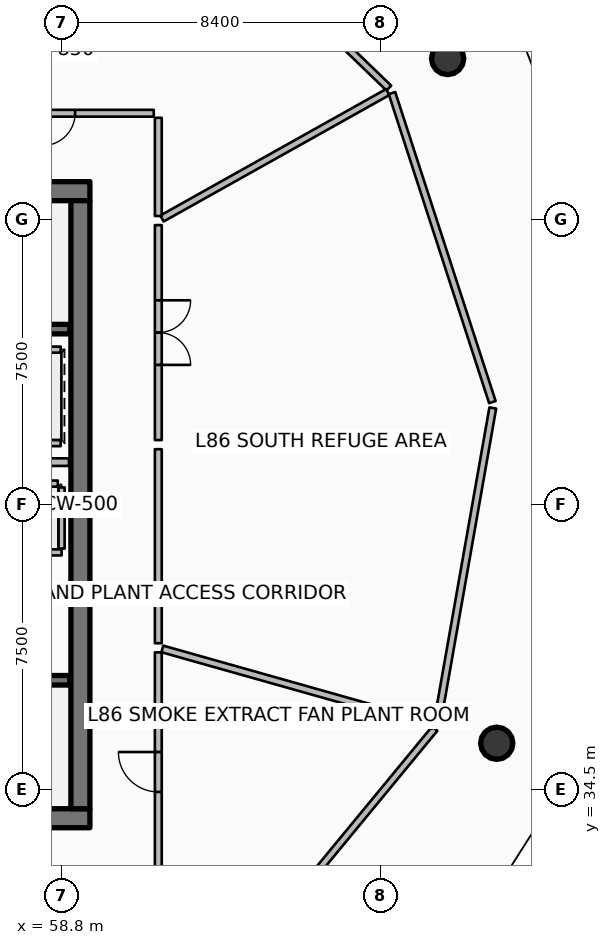
"""IFC4 building model, lengths in metres.
Left out: names, types, materials, properties, quantities, classifications, styles, units other than length and angle.
Written with IfcOpenShell. Run it as: python <this file> out.ifc"""

import sys

from ifc_helpers import new_model, si_unit, direction, frame, frame_2d, origin, origin_2d, place, context, subcontext, project, spatial, rectangle, circle, extrude, element, fill, save


model = new_model("IFC4")
c1 = context("Model", 3, precision=1e-05, world=origin(), true_north=direction((0.0, 1.0)))
c2 = subcontext(c1, "Body", "Model", "MODEL_VIEW")
j1 = project(units=[si_unit("LENGTHUNIT", "METRE"), si_unit("PLANEANGLEUNIT", "RADIAN")], contexts=[c1])
p1 = place(None, origin())
s1 = spatial("IfcSite", under=j1, at=p1, CompositionType="ELEMENT")
p2 = place(p1, origin())
s2 = spatial("IfcBuilding", under=s1, at=p2, CompositionType="ELEMENT")
p3 = place(p2, frame((0.0, 0.0, 343.1)))
s3 = spatial("IfcBuildingStorey", under=s2, at=p3, CompositionType="ELEMENT", Elevation=343.1)
for number, where, z_axis, x_axis in (
    (1, (49.95, 33.75, 0.0), (0.0, 0.0, 1.0), (1.0, 0.0, 0.0)),
    (2, (49.95, 50.25, 0.0), (0.0, 0.0, 1.0), (1.0, 0.0, 0.0)),
):
    element("IfcWall", number, at=place(p3, frame(where, z_axis=z_axis, x_axis=x_axis)), inside=s3, PredefinedType="SHEAR", context=c2, shape_type="SweptSolid", body=[
        extrude(rectangle(XDim=9.6, YDim=0.5, at=frame_2d((4.8, 0.0))), origin(), (0.0, 0.0, 1.0), 4.2),
    ])
p4 = place(p3, frame((59.3, 34.0, 0.0), z_axis=(0.0, 0.0, 1.0), x_axis=(0.0, 1.0, 0.0)))
e3 = element("IfcWall", 3, at=p4, inside=s3, PredefinedType="SHEAR", context=c2, shape_type="SweptSolid", body=[
    extrude(rectangle(XDim=16.0, YDim=0.5, at=frame_2d((8.0, 0.0))), origin(), (0.0, 0.0, 1.0), 4.2),
])
for number, where, z_axis, x_axis in (
    (4, (68.963, 53.74, 0.0), (0.0, 0.0, 1.0), (1.0, 0.0, 0.0)),
    (5, (70.256, 35.723, 0.0), (0.0, 0.0, 1.0), (1.0, 0.0, 0.0)),
):
    element("IfcColumn", number, at=place(p3, frame(where, z_axis=z_axis, x_axis=x_axis)), inside=s3, PredefinedType="COLUMN", context=c2, shape_type="SweptSolid", body=[
        extrude(circle(Radius=0.425, at=origin_2d()), origin(), (0.0, 0.0, 1.0), 3.94),
    ])
p5 = place(p3, frame((51.48, 46.62, 0.0), z_axis=(0.0, 0.0, 1.0), x_axis=(1.0, 0.0, 0.0)))
e6 = element("IfcWall", 6, at=p5, inside=s3, PredefinedType="SOLIDWALL", context=c2, shape_type="SweptSolid", body=[
    extrude(rectangle(XDim=7.54, YDim=0.25, at=frame_2d((3.77, 0.0))), origin(), (0.0, 0.0, 1.0), 3.94),
])
p6 = place(p5, frame((0.3, 0.0, 0.0)))
e7 = element("IfcOpeningElement", 7, at=p6, cuts=e6, PredefinedType="OPENING", context=c2, shape_type="SweptSolid", body=[
    extrude(rectangle(XDim=1.55, YDim=2.15, at=frame_2d((0.775, 1.075))), frame((0.0, 0.135, 0.0), z_axis=(0.0, -1.0, 0.0), x_axis=(1.0, 0.0, 0.0)), (0.0, 0.0, 1.0), 0.27),
])
p7 = place(p3, frame((51.48, 37.38, 0.0), z_axis=(0.0, 0.0, 1.0), x_axis=(1.0, 0.0, 0.0)))
e8 = element("IfcWall", 8, at=p7, inside=s3, PredefinedType="SOLIDWALL", context=c2, shape_type="SweptSolid", body=[
    extrude(rectangle(XDim=7.54, YDim=0.25, at=frame_2d((3.77, 0.0))), origin(), (0.0, 0.0, 1.0), 3.94),
])
p8 = place(p7, frame((0.3, 0.0, 0.0)))
e9 = element("IfcOpeningElement", 9, at=p8, cuts=e8, PredefinedType="OPENING", context=c2, shape_type="SweptSolid", body=[
    extrude(rectangle(XDim=1.55, YDim=2.15, at=frame_2d((0.775, 1.075))), frame((0.0, 0.135, 0.0), z_axis=(0.0, -1.0, 0.0), x_axis=(1.0, 0.0, 0.0)), (0.0, 0.0, 1.0), 0.27),
])
p9 = place(p3, frame((58.805, 40.745, 0.0), z_axis=(0.0, 0.0, 1.0), x_axis=(-1.0, 0.0, 0.0)))
e10 = element("IfcWall", 10, at=p9, inside=s3, PredefinedType="PARTITIONING", context=c2, shape_type="SweptSolid", body=[
    extrude(rectangle(XDim=2.11, YDim=0.16, at=frame_2d((1.055, 0.0))), origin(), (0.0, 0.0, 1.0), 3.94),
])
p10 = place(p9, frame((0.505, 0.0, 0.0)))
e11 = element("IfcOpeningElement", 11, at=p10, cuts=e10, PredefinedType="OPENING", context=c2, shape_type="SweptSolid", body=[
    extrude(rectangle(XDim=1.1, YDim=2.1, at=frame_2d((0.55, 1.05))), frame((0.0, 0.09, 0.0), z_axis=(0.0, -1.0, 0.0), x_axis=(1.0, 0.0, 0.0)), (0.0, 0.0, 1.0), 0.18),
])
p11 = place(p3, frame((58.805, 40.845, 0.0), z_axis=(0.0, 0.0, 1.0), x_axis=(0.0, 1.0, 0.0)))
e12 = element("IfcWall", 12, at=p11, inside=s3, PredefinedType="PARTITIONING", context=c2, shape_type="SweptSolid", body=[
    extrude(rectangle(XDim=1.61, YDim=0.16, at=frame_2d((0.805, 0.0))), origin(), (0.0, 0.0, 1.0), 3.94),
])
p12 = place(p3, frame((56.795, 42.555, 0.0), z_axis=(0.0, 0.0, 1.0), x_axis=(1.0, 0.0, 0.0)))
e13 = element("IfcWall", 13, at=p12, inside=s3, PredefinedType="PARTITIONING", context=c2, shape_type="SweptSolid", body=[
    extrude(rectangle(XDim=1.91, YDim=0.16, at=frame_2d((0.955, 0.0))), origin(), (0.0, 0.0, 1.0), 3.94),
])
for number, where, z_axis, x_axis in (
    (14, (56.72, 46.08, 0.0), (0.0, 0.0, 1.0), (1.0, 0.0, 0.0)),
    (15, (56.72, 43.62, 0.0), (0.0, 0.0, 1.0), (1.0, 0.0, 0.0)),
):
    element("IfcWall", number, at=place(p3, frame(where, z_axis=z_axis, x_axis=x_axis)), inside=s3, PredefinedType="PARTITIONING", context=c2, shape_type="SweptSolid", body=[
        extrude(rectangle(XDim=2.06, YDim=0.16, at=frame_2d((1.03, 0.0))), origin(), (0.0, 0.0, 1.0), 3.94),
    ])
p13 = place(p3, frame((50.12, 43.12, 0.0), z_axis=(0.0, 0.0, 1.0), x_axis=(1.0, 0.0, 0.0)))
e16 = element("IfcWall", 16, at=p13, inside=s3, PredefinedType="PARTITIONING", context=c2, shape_type="SweptSolid", body=[
    extrude(rectangle(XDim=8.88, YDim=0.2, at=frame_2d((4.44, 0.0))), origin(), (0.0, 0.0, 1.0), 3.94),
])
p14 = place(p3, frame((67.417, 52.962, 0.0), z_axis=(0.0, 0.0, 1.0), x_axis=(-0.719358516059, 0.694638989241, 0.0)))
e17 = element("IfcWall", 17, at=p14, inside=s3, PredefinedType="PARTITIONING", context=c2, shape_type="SweptSolid", body=[
    extrude(rectangle(XDim=8.425, YDim=0.18, at=frame_2d((4.212, 0.0))), origin(), (0.0, 0.0, 1.0), 2.933),
])
p15 = place(p3, frame((63.496, 29.886, 0.0), z_axis=(0.0, 0.0, 1.0), x_axis=(0.635999094609, 0.771689802743, 0.0)))
e18 = element("IfcWall", 18, at=p15, inside=s3, PredefinedType="PARTITIONING", context=c2, shape_type="SweptSolid", body=[
    extrude(rectangle(XDim=8.062, YDim=0.18, at=frame_2d((4.031, 0.0))), origin(), (0.0, 0.0, 1.0), 2.933),
])
p16 = place(p3, frame((68.688, 36.248, 0.0), z_axis=(0.0, 0.0, 1.0), x_axis=(0.173644811024, 0.984808346636, 0.0)))
e19 = element("IfcWall", 19, at=p16, inside=s3, PredefinedType="PARTITIONING", context=c2, shape_type="SweptSolid", body=[
    extrude(rectangle(XDim=8.425, YDim=0.18, at=frame_2d((4.212, 0.0))), origin(), (0.0, 0.0, 1.0), 2.933),
])
p17 = place(p3, frame((70.141, 44.699, 0.0), z_axis=(0.0, 0.0, 1.0), x_axis=(-0.309030537088, 0.951052115894, 0.0)))
e20 = element("IfcWall", 20, at=p17, inside=s3, PredefinedType="PARTITIONING", context=c2, shape_type="SweptSolid", body=[
    extrude(rectangle(XDim=8.549, YDim=0.18, at=frame_2d((4.274, 0.0))), origin(), (0.0, 0.0, 1.0), 2.933),
])
p18 = place(p3, frame((61.35, 31.82, 0.0), z_axis=(0.0, 0.0, 1.0), x_axis=(0.0, 1.0, 0.0)))
e21 = element("IfcWall", 21, at=p18, inside=s3, PredefinedType="PARTITIONING", context=c2, shape_type="SweptSolid", body=[
    extrude(rectangle(XDim=6.295, YDim=0.18, at=frame_2d((3.147, 0.0))), origin(), (0.0, 0.0, 1.0), 2.933),
])
p19 = place(p18, frame((2.622, 0.0, 0.0)))
e22 = element("IfcOpeningElement", 22, at=p19, cuts=e21, PredefinedType="OPENING", context=c2, shape_type="SweptSolid", body=[
    extrude(rectangle(XDim=1.05, YDim=2.1, at=frame_2d((0.525, 1.05))), frame((0.0, 0.1, 0.0), z_axis=(0.0, -1.0, 0.0), x_axis=(1.0, 0.0, 0.0)), (0.0, 0.0, 1.0), 0.2),
])
p20 = place(p3, frame((61.456, 38.205, 0.0), z_axis=(0.0, 0.0, 1.0), x_axis=(0.962454537961, -0.271442926522, 0.0)))
e23 = element("IfcWall", 23, at=p20, inside=s3, PredefinedType="PARTITIONING", context=c2, shape_type="SweptSolid", body=[
    extrude(rectangle(XDim=7.4, YDim=0.18, at=frame_2d((3.7, 0.0))), origin(), (0.0, 0.0, 1.0), 2.933),
])
p21 = place(p3, frame((61.35, 38.355, 0.0), z_axis=(0.0, 0.0, 1.0), x_axis=(0.0, 1.0, 0.0)))
e24 = element("IfcWall", 24, at=p21, inside=s3, PredefinedType="PARTITIONING", context=c2, shape_type="SweptSolid", body=[
    extrude(rectangle(XDim=5.105, YDim=0.18, at=frame_2d((2.553, 0.0))), origin(), (0.0, 0.0, 1.0), 2.933),
])
p22 = place(p3, frame((61.35, 43.7, 0.0), z_axis=(0.0, 0.0, 1.0), x_axis=(0.0, 1.0, 0.0)))
e25 = element("IfcWall", 25, at=p22, inside=s3, PredefinedType="PARTITIONING", context=c2, shape_type="SweptSolid", body=[
    extrude(rectangle(XDim=5.656, YDim=0.18, at=frame_2d((2.828, 0.0))), origin(), (0.0, 0.0, 1.0), 2.933),
])
p23 = place(p22, frame((1.978, 0.0, 0.0)))
e26 = element("IfcOpeningElement", 26, at=p23, cuts=e25, PredefinedType="OPENING", context=c2, shape_type="SweptSolid", body=[
    extrude(rectangle(XDim=1.7, YDim=2.15, at=frame_2d((0.85, 1.075))), frame((0.0, 0.1, 0.0), z_axis=(0.0, -1.0, 0.0), x_axis=(1.0, 0.0, 0.0)), (0.0, 0.0, 1.0), 0.2),
])
p24 = place(p3, frame((61.446, 49.53, 0.0), z_axis=(0.0, 0.0, 1.0), x_axis=(0.872491341717, 0.488629571995, 0.0)))
e27 = element("IfcWall", 27, at=p24, inside=s3, PredefinedType="PARTITIONING", context=c2, shape_type="SweptSolid", body=[
    extrude(rectangle(XDim=6.809, YDim=0.18, at=frame_2d((3.405, 0.0))), origin(), (0.0, 0.0, 1.0), 2.933),
])
p25 = place(p3, frame((61.35, 49.596, 0.0), z_axis=(0.0, 0.0, 1.0), x_axis=(0.0, 1.0, 0.0)))
e28 = element("IfcWall", 28, at=p25, inside=s3, PredefinedType="PARTITIONING", context=c2, shape_type="SweptSolid", body=[
    extrude(rectangle(XDim=2.583, YDim=0.18, at=frame_2d((1.292, 0.0))), origin(), (0.0, 0.0, 1.0), 2.933),
])
p26 = place(p3, frame((61.23, 52.3, 0.0), z_axis=(0.0, 0.0, 1.0), x_axis=(-1.0, 0.0, 0.0)))
e29 = element("IfcWall", 29, at=p26, inside=s3, PredefinedType="PARTITIONING", context=c2, shape_type="SweptSolid", body=[
    extrude(rectangle(XDim=4.99, YDim=0.18, at=frame_2d((2.495, 0.0))), origin(), (0.0, 0.0, 1.0), 2.933),
])
p27 = place(p26, frame((2.07, 0.0, 0.0)))
e30 = element("IfcOpeningElement", 30, at=p27, cuts=e29, PredefinedType="OPENING", context=c2, shape_type="SweptSolid", body=[
    extrude(rectangle(XDim=0.85, YDim=2.06, at=frame_2d((0.425, 1.03))), frame((0.0, 0.1, 0.0), z_axis=(0.0, -1.0, 0.0), x_axis=(1.0, 0.0, 0.0)), (0.0, 0.0, 1.0), 0.2),
])
p28 = place(p3, frame((56.188, 52.386, 0.0), z_axis=(0.0, 0.0, 1.0), x_axis=(0.619086016157, 0.785323184809, 0.0)))
e31 = element("IfcWall", 31, at=p28, inside=s3, PredefinedType="PARTITIONING", context=c2, shape_type="SweptSolid", body=[
    extrude(rectangle(XDim=8.155, YDim=0.18, at=frame_2d((4.078, 0.0))), origin(), (0.0, 0.0, 1.0), 2.933),
])
p29 = place(p19, origin())
e32 = element("IfcDoor", 32, at=p29, inside=s3, OperationType="SINGLE_SWING_RIGHT", PredefinedType="DOOR", context=c2, shape_type="SweptSolid", body=[
    extrude(rectangle(XDim=1.05, YDim=2.1, at=frame_2d((0.525, 1.05))), frame((0.0, 0.025, 0.0), z_axis=(0.0, -1.0, 0.0), x_axis=(1.0, 0.0, 0.0)), (0.0, 0.0, 1.0), 0.05),
])
fill(e22, e32)
p30 = place(p23, origin())
e33 = element("IfcDoor", 33, at=p30, inside=s3, OperationType="DOUBLE_DOOR_SINGLE_SWING", PredefinedType="DOOR", context=c2, shape_type="SweptSolid", body=[
    extrude(rectangle(XDim=1.7, YDim=2.15, at=frame_2d((0.85, 1.075))), frame((0.0, 0.025, 0.0), z_axis=(0.0, -1.0, 0.0), x_axis=(1.0, 0.0, 0.0)), (0.0, 0.0, 1.0), 0.05),
])
fill(e26, e33)
p31 = place(p27, origin())
e34 = element("IfcDoor", 34, at=p31, inside=s3, OperationType="SINGLE_SWING_RIGHT", PredefinedType="DOOR", context=c2, shape_type="SweptSolid", body=[
    extrude(rectangle(XDim=0.85, YDim=2.06, at=frame_2d((0.425, 1.03))), frame((0.0, 0.025, 0.0), z_axis=(0.0, -1.0, 0.0), x_axis=(1.0, 0.0, 0.0)), (0.0, 0.0, 1.0), 0.05),
])
fill(e30, e34)
save(model, sys.argv[1])
